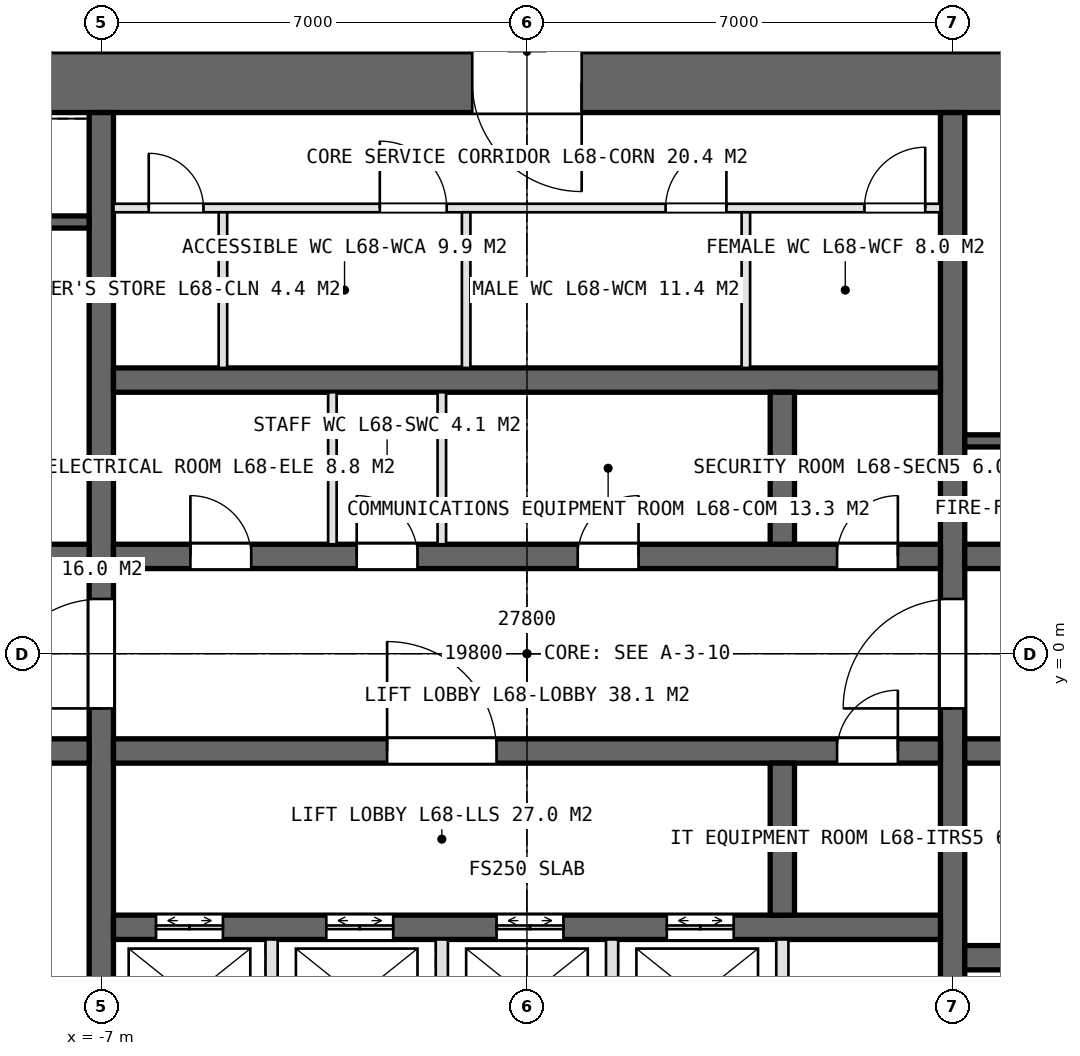
"""IFC4 building model, lengths in metres.
Left out: names, types, materials, properties, quantities, classifications, styles, units other than length and angle.
Written with IfcOpenShell. Run it as: python <this file> out.ifc"""

import sys

from ifc_helpers import new_model, si_unit, direction, frame, frame_2d, origin, place, context, subcontext, project, spatial, rectangle, extrude, element, fill, save


model = new_model("IFC4")
c1 = context("Model", 3, precision=1e-05, world=origin(), true_north=direction((0.0, 1.0)))
c2 = subcontext(c1, "Body", "Model", "MODEL_VIEW")
j1 = project(units=[si_unit("LENGTHUNIT", "METRE"), si_unit("PLANEANGLEUNIT", "RADIAN")], contexts=[c1])
p1 = place(None, origin())
s1 = spatial("IfcSite", under=j1, at=p1, CompositionType="ELEMENT")
p2 = place(p1, origin())
s2 = spatial("IfcBuilding", under=s1, at=p2, CompositionType="ELEMENT")
p3 = place(p2, frame((0.0, 0.0, 304.8)))
s3 = spatial("IfcBuildingStorey", under=s2, at=p3, CompositionType="ELEMENT", Elevation=304.8)
p4 = place(p3, frame((13.9, 9.4, 0.0), z_axis=(0.0, 0.0, 1.0), x_axis=(-1.0, 0.0, 0.0)))
e1 = element("IfcWall", 1, at=p4, inside=s3, PredefinedType="SHEAR", context=c2, shape_type="SweptSolid", body=[
    extrude(rectangle(XDim=27.8, YDim=1.0, at=frame_2d((13.9, 0.0))), origin(), (0.0, 0.0, 1.0), 4.2),
])
p5 = place(p4, frame((23.9, 0.0, 0.0)))
e2 = element("IfcOpeningElement", 2, at=p5, cuts=e1, PredefinedType="OPENING", context=c2, shape_type="SweptSolid", body=[
    extrude(rectangle(XDim=1.0, YDim=2.4, at=frame_2d((0.5, 1.2))), frame((0.0, 0.51, 0.0), z_axis=(0.0, -1.0, 0.0), x_axis=(1.0, 0.0, 0.0)), (0.0, 0.0, 1.0), 1.02),
])
p6 = place(p4, frame((13.0, 0.0, 0.0)))
e3 = element("IfcOpeningElement", 3, at=p6, cuts=e1, PredefinedType="OPENING", context=c2, shape_type="SweptSolid", body=[
    extrude(rectangle(XDim=1.8, YDim=2.4, at=frame_2d((0.9, 1.2))), frame((0.0, 0.51, 0.0), z_axis=(0.0, -1.0, 0.0), x_axis=(1.0, 0.0, 0.0)), (0.0, 0.0, 1.0), 1.02),
])
p7 = place(p3, frame((-7.0, -8.9, 0.0), z_axis=(0.0, 0.0, 1.0), x_axis=(0.0, 1.0, 0.0)))
e4 = element("IfcWall", 4, at=p7, inside=s3, PredefinedType="SHEAR", context=c2, shape_type="SweptSolid", body=[
    extrude(rectangle(XDim=17.8, YDim=0.4, at=frame_2d((8.9, 0.0))), origin(), (0.0, 0.0, 1.0), 4.2),
])
p8 = place(p7, frame((8.0, 0.0, 0.0)))
e5 = element("IfcOpeningElement", 5, at=p8, cuts=e4, PredefinedType="OPENING", context=c2, shape_type="SweptSolid", body=[
    extrude(rectangle(XDim=1.8, YDim=2.4, at=frame_2d((0.9, 1.2))), frame((0.0, 0.21, 0.0), z_axis=(0.0, -1.0, 0.0), x_axis=(1.0, 0.0, 0.0)), (0.0, 0.0, 1.0), 0.42),
])
p9 = place(p3, frame((7.0, -8.9, 0.0), z_axis=(0.0, 0.0, 1.0), x_axis=(0.0, 1.0, 0.0)))
e6 = element("IfcWall", 6, at=p9, inside=s3, PredefinedType="SHEAR", context=c2, shape_type="SweptSolid", body=[
    extrude(rectangle(XDim=17.8, YDim=0.4, at=frame_2d((8.9, 0.0))), origin(), (0.0, 0.0, 1.0), 4.2),
])
p10 = place(p9, frame((8.0, 0.0, 0.0)))
e7 = element("IfcOpeningElement", 7, at=p10, cuts=e6, PredefinedType="OPENING", context=c2, shape_type="SweptSolid", body=[
    extrude(rectangle(XDim=1.8, YDim=2.4, at=frame_2d((0.9, 1.2))), frame((0.0, 0.21, 0.0), z_axis=(0.0, -1.0, 0.0), x_axis=(1.0, 0.0, 0.0)), (0.0, 0.0, 1.0), 0.42),
])
p11 = place(p3, frame((-6.8, 1.6, 0.0), z_axis=(0.0, 0.0, 1.0), x_axis=(1.0, 0.0, 0.0)))
e8 = element("IfcWall", 8, at=p11, inside=s3, PredefinedType="SHEAR", context=c2, shape_type="SweptSolid", body=[
    extrude(rectangle(XDim=13.6, YDim=0.4, at=frame_2d((6.8, 0.0))), origin(), (0.0, 0.0, 1.0), 4.2),
])
p12 = place(p11, frame((1.265, 0.0, 0.0)))
e9 = element("IfcOpeningElement", 9, at=p12, cuts=e8, PredefinedType="OPENING", context=c2, shape_type="SweptSolid", body=[
    extrude(rectangle(XDim=1.0, YDim=2.4, at=frame_2d((0.5, 1.2))), frame((0.0, 0.21, 0.0), z_axis=(0.0, -1.0, 0.0), x_axis=(1.0, 0.0, 0.0)), (0.0, 0.0, 1.0), 0.42),
])
p13 = place(p11, frame((4.0, 0.0, 0.0)))
e10 = element("IfcOpeningElement", 10, at=p13, cuts=e8, PredefinedType="OPENING", context=c2, shape_type="SweptSolid", body=[
    extrude(rectangle(XDim=1.0, YDim=2.4, at=frame_2d((0.5, 1.2))), frame((0.0, 0.21, 0.0), z_axis=(0.0, -1.0, 0.0), x_axis=(1.0, 0.0, 0.0)), (0.0, 0.0, 1.0), 0.42),
])
p14 = place(p11, frame((7.635, 0.0, 0.0)))
e11 = element("IfcOpeningElement", 11, at=p14, cuts=e8, PredefinedType="OPENING", context=c2, shape_type="SweptSolid", body=[
    extrude(rectangle(XDim=1.0, YDim=2.4, at=frame_2d((0.5, 1.2))), frame((0.0, 0.21, 0.0), z_axis=(0.0, -1.0, 0.0), x_axis=(1.0, 0.0, 0.0)), (0.0, 0.0, 1.0), 0.42),
])
p15 = place(p11, frame((11.9, 0.0, 0.0)))
e12 = element("IfcOpeningElement", 12, at=p15, cuts=e8, PredefinedType="OPENING", context=c2, shape_type="SweptSolid", body=[
    extrude(rectangle(XDim=1.0, YDim=2.4, at=frame_2d((0.5, 1.2))), frame((0.0, 0.21, 0.0), z_axis=(0.0, -1.0, 0.0), x_axis=(1.0, 0.0, 0.0)), (0.0, 0.0, 1.0), 0.42),
])
p16 = place(p3, frame((-6.8, -1.6, 0.0), z_axis=(0.0, 0.0, 1.0), x_axis=(1.0, 0.0, 0.0)))
e13 = element("IfcWall", 13, at=p16, inside=s3, PredefinedType="SHEAR", context=c2, shape_type="SweptSolid", body=[
    extrude(rectangle(XDim=13.6, YDim=0.4, at=frame_2d((6.8, 0.0))), origin(), (0.0, 0.0, 1.0), 4.2),
])
p17 = place(p16, frame((11.9, 0.0, 0.0)))
e14 = element("IfcOpeningElement", 14, at=p17, cuts=e13, PredefinedType="OPENING", context=c2, shape_type="SweptSolid", body=[
    extrude(rectangle(XDim=1.0, YDim=2.4, at=frame_2d((0.5, 1.2))), frame((0.0, 0.21, 0.0), z_axis=(0.0, -1.0, 0.0), x_axis=(1.0, 0.0, 0.0)), (0.0, 0.0, 1.0), 0.42),
])
p18 = place(p16, frame((4.5, 0.0, 0.0)))
e15 = element("IfcOpeningElement", 15, at=p18, cuts=e13, PredefinedType="OPENING", context=c2, shape_type="SweptSolid", body=[
    extrude(rectangle(XDim=1.8, YDim=2.4, at=frame_2d((0.9, 1.2))), frame((0.0, 0.21, 0.0), z_axis=(0.0, -1.0, 0.0), x_axis=(1.0, 0.0, 0.0)), (0.0, 0.0, 1.0), 0.42),
])
p19 = place(p3, frame((-6.8, 4.5, 0.0), z_axis=(0.0, 0.0, 1.0), x_axis=(1.0, 0.0, 0.0)))
e16 = element("IfcWall", 16, at=p19, inside=s3, PredefinedType="SHEAR", context=c2, shape_type="SweptSolid", body=[
    extrude(rectangle(XDim=13.6, YDim=0.4, at=frame_2d((6.8, 0.0))), origin(), (0.0, 0.0, 1.0), 4.2),
])
p20 = place(p3, frame((-6.8, -4.5, 0.0), z_axis=(0.0, 0.0, 1.0), x_axis=(1.0, 0.0, 0.0)))
e17 = element("IfcWall", 17, at=p20, inside=s3, PredefinedType="SHEAR", context=c2, shape_type="SweptSolid", body=[
    extrude(rectangle(XDim=13.6, YDim=0.4, at=frame_2d((6.8, 0.0))), origin(), (0.0, 0.0, 1.0), 4.2),
])
p21 = place(p20, frame((0.7, 0.0, 0.0)))
e18 = element("IfcOpeningElement", 18, at=p21, cuts=e17, PredefinedType="OPENING", context=c2, shape_type="SweptSolid", body=[
    extrude(rectangle(XDim=1.1, YDim=2.4, at=frame_2d((0.55, 1.2))), frame((0.0, 0.21, 0.0), z_axis=(0.0, -1.0, 0.0), x_axis=(1.0, 0.0, 0.0)), (0.0, 0.0, 1.0), 0.42),
])
p22 = place(p20, frame((3.5, 0.0, 0.0)))
e19 = element("IfcOpeningElement", 19, at=p22, cuts=e17, PredefinedType="OPENING", context=c2, shape_type="SweptSolid", body=[
    extrude(rectangle(XDim=1.1, YDim=2.4, at=frame_2d((0.55, 1.2))), frame((0.0, 0.21, 0.0), z_axis=(0.0, -1.0, 0.0), x_axis=(1.0, 0.0, 0.0)), (0.0, 0.0, 1.0), 0.42),
])
p23 = place(p20, frame((6.3, 0.0, 0.0)))
e20 = element("IfcOpeningElement", 20, at=p23, cuts=e17, PredefinedType="OPENING", context=c2, shape_type="SweptSolid", body=[
    extrude(rectangle(XDim=1.1, YDim=2.4, at=frame_2d((0.55, 1.2))), frame((0.0, 0.21, 0.0), z_axis=(0.0, -1.0, 0.0), x_axis=(1.0, 0.0, 0.0)), (0.0, 0.0, 1.0), 0.42),
])
p24 = place(p20, frame((9.1, 0.0, 0.0)))
e21 = element("IfcOpeningElement", 21, at=p24, cuts=e17, PredefinedType="OPENING", context=c2, shape_type="SweptSolid", body=[
    extrude(rectangle(XDim=1.1, YDim=2.4, at=frame_2d((0.55, 1.2))), frame((0.0, 0.21, 0.0), z_axis=(0.0, -1.0, 0.0), x_axis=(1.0, 0.0, 0.0)), (0.0, 0.0, 1.0), 0.42),
])
for number, where, z_axis, x_axis in (
    (22, (-12.9, 1.6, 0.0), (0.0, 0.0, 1.0), (1.0, 0.0, 0.0)),
    (23, (-12.9, -1.6, 0.0), (0.0, 0.0, 1.0), (1.0, 0.0, 0.0)),
):
    element("IfcWall", number, at=place(p3, frame(where, z_axis=z_axis, x_axis=x_axis)), inside=s3, PredefinedType="SHEAR", context=c2, shape_type="SweptSolid", body=[
        extrude(rectangle(XDim=5.7, YDim=0.4, at=frame_2d((2.85, 0.0))), origin(), (0.0, 0.0, 1.0), 4.2),
    ])
p25 = place(p3, frame((7.2, 1.6, 0.0), z_axis=(0.0, 0.0, 1.0), x_axis=(1.0, 0.0, 0.0)))
e24 = element("IfcWall", 24, at=p25, inside=s3, PredefinedType="SHEAR", context=c2, shape_type="SweptSolid", body=[
    extrude(rectangle(XDim=5.7, YDim=0.4, at=frame_2d((2.85, 0.0))), origin(), (0.0, 0.0, 1.0), 4.2),
])
p26 = place(p25, frame((0.7, 0.0, 0.0)))
e25 = element("IfcOpeningElement", 25, at=p26, cuts=e24, PredefinedType="OPENING", context=c2, shape_type="SweptSolid", body=[
    extrude(rectangle(XDim=1.0, YDim=2.4, at=frame_2d((0.5, 1.2))), frame((0.0, 0.21, 0.0), z_axis=(0.0, -1.0, 0.0), x_axis=(1.0, 0.0, 0.0)), (0.0, 0.0, 1.0), 0.42),
])
p27 = place(p3, frame((7.2, -1.6, 0.0), z_axis=(0.0, 0.0, 1.0), x_axis=(1.0, 0.0, 0.0)))
e26 = element("IfcWall", 26, at=p27, inside=s3, PredefinedType="SHEAR", context=c2, shape_type="SweptSolid", body=[
    extrude(rectangle(XDim=5.7, YDim=0.4, at=frame_2d((2.85, 0.0))), origin(), (0.0, 0.0, 1.0), 4.2),
])
p28 = place(p27, frame((0.9, 0.0, 0.0)))
e27 = element("IfcOpeningElement", 27, at=p28, cuts=e26, PredefinedType="OPENING", context=c2, shape_type="SweptSolid", body=[
    extrude(rectangle(XDim=1.3, YDim=2.4, at=frame_2d((0.65, 1.2))), frame((0.0, 0.21, 0.0), z_axis=(0.0, -1.0, 0.0), x_axis=(1.0, 0.0, 0.0)), (0.0, 0.0, 1.0), 0.42),
])
p29 = place(p27, frame((3.95, 0.0, 0.0)))
e28 = element("IfcOpeningElement", 28, at=p29, cuts=e26, PredefinedType="OPENING", context=c2, shape_type="SweptSolid", body=[
    extrude(rectangle(XDim=1.3, YDim=2.4, at=frame_2d((0.65, 1.2))), frame((0.0, 0.21, 0.0), z_axis=(0.0, -1.0, 0.0), x_axis=(1.0, 0.0, 0.0)), (0.0, 0.0, 1.0), 0.42),
])
p30 = place(p3, frame((7.2, -5.0, 0.0), z_axis=(0.0, 0.0, 1.0), x_axis=(1.0, 0.0, 0.0)))
e29 = element("IfcWall", 29, at=p30, inside=s3, PredefinedType="SHEAR", context=c2, shape_type="SweptSolid", body=[
    extrude(rectangle(XDim=5.7, YDim=0.4, at=frame_2d((2.85, 0.0))), origin(), (0.0, 0.0, 1.0), 4.2),
])
for number, where, z_axis, x_axis in (
    (30, (4.2, 1.8, 0.0), (0.0, 0.0, 1.0), (0.0, 1.0, 0.0)),
    (31, (4.2, -4.3, 0.0), (0.0, 0.0, 1.0), (0.0, 1.0, 0.0)),
):
    element("IfcWall", number, at=place(p3, frame(where, z_axis=z_axis, x_axis=x_axis)), inside=s3, PredefinedType="SHEAR", context=c2, shape_type="SweptSolid", body=[
        extrude(rectangle(XDim=2.5, YDim=0.4, at=frame_2d((1.25, 0.0))), origin(), (0.0, 0.0, 1.0), 4.2),
    ])
p31 = place(p3, frame((-6.8, 7.33, 0.0), z_axis=(0.0, 0.0, 1.0), x_axis=(1.0, 0.0, 0.0)))
e32 = element("IfcWall", 32, at=p31, inside=s3, PredefinedType="PARTITIONING", context=c2, shape_type="SweptSolid", body=[
    extrude(rectangle(XDim=13.6, YDim=0.14, at=frame_2d((6.8, 0.0))), origin(), (0.0, 0.0, 1.0), 3.95),
])
p32 = place(p31, frame((0.58, 0.0, 0.0)))
e33 = element("IfcOpeningElement", 33, at=p32, cuts=e32, PredefinedType="OPENING", context=c2, shape_type="SweptSolid", body=[
    extrude(rectangle(XDim=0.9, YDim=2.4, at=frame_2d((0.45, 1.2))), frame((0.0, 0.08, 0.0), z_axis=(0.0, -1.0, 0.0), x_axis=(1.0, 0.0, 0.0)), (0.0, 0.0, 1.0), 0.16),
])
p33 = place(p31, frame((4.38, 0.0, 0.0)))
e34 = element("IfcOpeningElement", 34, at=p33, cuts=e32, PredefinedType="OPENING", context=c2, shape_type="SweptSolid", body=[
    extrude(rectangle(XDim=1.1, YDim=2.4, at=frame_2d((0.55, 1.2))), frame((0.0, 0.08, 0.0), z_axis=(0.0, -1.0, 0.0), x_axis=(1.0, 0.0, 0.0)), (0.0, 0.0, 1.0), 0.16),
])
p34 = place(p31, frame((9.08, 0.0, 0.0)))
e35 = element("IfcOpeningElement", 35, at=p34, cuts=e32, PredefinedType="OPENING", context=c2, shape_type="SweptSolid", body=[
    extrude(rectangle(XDim=1.0, YDim=2.4, at=frame_2d((0.5, 1.2))), frame((0.0, 0.08, 0.0), z_axis=(0.0, -1.0, 0.0), x_axis=(1.0, 0.0, 0.0)), (0.0, 0.0, 1.0), 0.16),
])
p35 = place(p31, frame((12.35, 0.0, 0.0)))
e36 = element("IfcOpeningElement", 36, at=p35, cuts=e32, PredefinedType="OPENING", context=c2, shape_type="SweptSolid", body=[
    extrude(rectangle(XDim=1.0, YDim=2.4, at=frame_2d((0.5, 1.2))), frame((0.0, 0.08, 0.0), z_axis=(0.0, -1.0, 0.0), x_axis=(1.0, 0.0, 0.0)), (0.0, 0.0, 1.0), 0.16),
])
for number, where, z_axis, x_axis in (
    (37, (-5.0, 4.7, 0.0), (0.0, 0.0, 1.0), (0.0, 1.0, 0.0)),
    (38, (-1.0, 4.7, 0.0), (0.0, 0.0, 1.0), (0.0, 1.0, 0.0)),
    (39, (3.6, 4.7, 0.0), (0.0, 0.0, 1.0), (0.0, 1.0, 0.0)),
):
    element("IfcWall", number, at=place(p3, frame(where, z_axis=z_axis, x_axis=x_axis)), inside=s3, PredefinedType="PARTITIONING", context=c2, shape_type="SweptSolid", body=[
        extrude(rectangle(XDim=2.56, YDim=0.14, at=frame_2d((1.28, 0.0))), origin(), (0.0, 0.0, 1.0), 3.95),
    ])
for number, where, z_axis, x_axis in (
    (40, (-3.2, 1.8, 0.0), (0.0, 0.0, 1.0), (0.0, 1.0, 0.0)),
    (41, (-1.4, 1.8, 0.0), (0.0, 0.0, 1.0), (0.0, 1.0, 0.0)),
):
    element("IfcWall", number, at=place(p3, frame(where, z_axis=z_axis, x_axis=x_axis)), inside=s3, PredefinedType="PARTITIONING", context=c2, shape_type="SweptSolid", body=[
        extrude(rectangle(XDim=2.5, YDim=0.14, at=frame_2d((1.25, 0.0))), origin(), (0.0, 0.0, 1.0), 3.95),
    ])
for number, where, z_axis, x_axis in (
    (42, (-4.2, -4.7, 0.0), (0.0, 0.0, 1.0), (0.0, -1.0, 0.0)),
    (43, (-1.4, -4.7, 0.0), (0.0, 0.0, 1.0), (0.0, -1.0, 0.0)),
    (44, (1.4, -4.7, 0.0), (0.0, 0.0, 1.0), (0.0, -1.0, 0.0)),
    (45, (4.2, -4.7, 0.0), (0.0, 0.0, 1.0), (0.0, -1.0, 0.0)),
):
    element("IfcWall", number, at=place(p3, frame(where, z_axis=z_axis, x_axis=x_axis)), inside=s3, PredefinedType="PARTITIONING", context=c2, shape_type="SweptSolid", body=[
        extrude(rectangle(XDim=4.2, YDim=0.2, at=frame_2d((2.1, 0.0))), origin(), (0.0, 0.0, 1.0), 4.2),
    ])
for number, where, z_axis, x_axis in (
    (46, (-9.15, 7.1, 0.0), (0.0, 0.0, 1.0), (1.0, 0.0, 0.0)),
    (47, (9.15, 3.5, 0.0), (0.0, 0.0, 1.0), (-1.0, 0.0, 0.0)),
):
    element("IfcWall", number, at=place(p3, frame(where, z_axis=z_axis, x_axis=x_axis)), inside=s3, PredefinedType="SOLIDWALL", context=c2, shape_type="SweptSolid", body=[
        extrude(rectangle(XDim=1.95, YDim=0.2, at=frame_2d((0.975, 0.0))), origin(), (0.0, 0.0, 1.0), 4.2),
    ])
p36 = place(p8, origin())
e48 = element("IfcDoor", 48, at=p36, inside=s3, OperationType="DOUBLE_DOOR_SINGLE_SWING", PredefinedType="DOOR", context=c2, shape_type="SweptSolid", body=[
    extrude(rectangle(XDim=1.8, YDim=2.4, at=frame_2d((0.9, 1.2))), frame((0.0, 0.025, 0.0), z_axis=(0.0, -1.0, 0.0), x_axis=(1.0, 0.0, 0.0)), (0.0, 0.0, 1.0), 0.05),
])
fill(e5, e48)
p37 = place(p10, origin())
e49 = element("IfcDoor", 49, at=p37, inside=s3, OperationType="DOUBLE_DOOR_SINGLE_SWING", PredefinedType="DOOR", context=c2, shape_type="SweptSolid", body=[
    extrude(rectangle(XDim=1.8, YDim=2.4, at=frame_2d((0.9, 1.2))), frame((0.0, 0.025, 0.0), z_axis=(0.0, -1.0, 0.0), x_axis=(1.0, 0.0, 0.0)), (0.0, 0.0, 1.0), 0.05),
])
fill(e7, e49)
p38 = place(p32, origin())
e50 = element("IfcDoor", 50, at=p38, inside=s3, OperationType="SINGLE_SWING_LEFT", PredefinedType="DOOR", context=c2, shape_type="SweptSolid", body=[
    extrude(rectangle(XDim=0.9, YDim=2.4, at=frame_2d((0.45, 1.2))), frame((0.0, 0.025, 0.0), z_axis=(0.0, -1.0, 0.0), x_axis=(1.0, 0.0, 0.0)), (0.0, 0.0, 1.0), 0.05),
])
fill(e33, e50)
p39 = place(p33, origin())
e51 = element("IfcDoor", 51, at=p39, inside=s3, OperationType="SINGLE_SWING_LEFT", PredefinedType="DOOR", context=c2, shape_type="SweptSolid", body=[
    extrude(rectangle(XDim=1.1, YDim=2.4, at=frame_2d((0.55, 1.2))), frame((0.0, 0.025, 0.0), z_axis=(0.0, -1.0, 0.0), x_axis=(1.0, 0.0, 0.0)), (0.0, 0.0, 1.0), 0.05),
])
fill(e34, e51)
p40 = place(p34, origin())
e52 = element("IfcDoor", 52, at=p40, inside=s3, OperationType="SINGLE_SWING_RIGHT", PredefinedType="DOOR", context=c2, shape_type="SweptSolid", body=[
    extrude(rectangle(XDim=1.0, YDim=2.4, at=frame_2d((0.5, 1.2))), frame((0.0, 0.025, 0.0), z_axis=(0.0, -1.0, 0.0), x_axis=(1.0, 0.0, 0.0)), (0.0, 0.0, 1.0), 0.05),
])
fill(e35, e52)
p41 = place(p35, origin())
e53 = element("IfcDoor", 53, at=p41, inside=s3, OperationType="SINGLE_SWING_RIGHT", PredefinedType="DOOR", context=c2, shape_type="SweptSolid", body=[
    extrude(rectangle(XDim=1.0, YDim=2.4, at=frame_2d((0.5, 1.2))), frame((0.0, 0.025, 0.0), z_axis=(0.0, -1.0, 0.0), x_axis=(1.0, 0.0, 0.0)), (0.0, 0.0, 1.0), 0.05),
])
fill(e36, e53)
p42 = place(p12, origin())
e54 = element("IfcDoor", 54, at=p42, inside=s3, OperationType="SINGLE_SWING_LEFT", PredefinedType="DOOR", context=c2, shape_type="SweptSolid", body=[
    extrude(rectangle(XDim=1.0, YDim=2.4, at=frame_2d((0.5, 1.2))), frame((0.0, 0.025, 0.0), z_axis=(0.0, -1.0, 0.0), x_axis=(1.0, 0.0, 0.0)), (0.0, 0.0, 1.0), 0.05),
])
fill(e9, e54)
p43 = place(p13, origin())
e55 = element("IfcDoor", 55, at=p43, inside=s3, OperationType="SINGLE_SWING_LEFT", PredefinedType="DOOR", context=c2, shape_type="SweptSolid", body=[
    extrude(rectangle(XDim=1.0, YDim=2.4, at=frame_2d((0.5, 1.2))), frame((0.0, 0.025, 0.0), z_axis=(0.0, -1.0, 0.0), x_axis=(1.0, 0.0, 0.0)), (0.0, 0.0, 1.0), 0.05),
])
fill(e10, e55)
p44 = place(p14, origin())
e56 = element("IfcDoor", 56, at=p44, inside=s3, OperationType="SINGLE_SWING_RIGHT", PredefinedType="DOOR", context=c2, shape_type="SweptSolid", body=[
    extrude(rectangle(XDim=1.0, YDim=2.4, at=frame_2d((0.5, 1.2))), frame((0.0, 0.025, 0.0), z_axis=(0.0, -1.0, 0.0), x_axis=(1.0, 0.0, 0.0)), (0.0, 0.0, 1.0), 0.05),
])
fill(e11, e56)
p45 = place(p15, origin())
e57 = element("IfcDoor", 57, at=p45, inside=s3, OperationType="SINGLE_SWING_RIGHT", PredefinedType="DOOR", context=c2, shape_type="SweptSolid", body=[
    extrude(rectangle(XDim=1.0, YDim=2.4, at=frame_2d((0.5, 1.2))), frame((0.0, 0.025, 0.0), z_axis=(0.0, -1.0, 0.0), x_axis=(1.0, 0.0, 0.0)), (0.0, 0.0, 1.0), 0.05),
])
fill(e12, e57)
p46 = place(p17, origin())
e58 = element("IfcDoor", 58, at=p46, inside=s3, OperationType="SINGLE_SWING_RIGHT", PredefinedType="DOOR", context=c2, shape_type="SweptSolid", body=[
    extrude(rectangle(XDim=1.0, YDim=2.4, at=frame_2d((0.5, 1.2))), frame((0.0, 0.025, 0.0), z_axis=(0.0, -1.0, 0.0), x_axis=(1.0, 0.0, 0.0)), (0.0, 0.0, 1.0), 0.05),
])
fill(e14, e58)
p47 = place(p18, origin())
e59 = element("IfcDoor", 59, at=p47, inside=s3, OperationType="DOUBLE_DOOR_SINGLE_SWING", PredefinedType="DOOR", context=c2, shape_type="SweptSolid", body=[
    extrude(rectangle(XDim=1.8, YDim=2.4, at=frame_2d((0.9, 1.2))), frame((0.0, 0.025, 0.0), z_axis=(0.0, -1.0, 0.0), x_axis=(1.0, 0.0, 0.0)), (0.0, 0.0, 1.0), 0.05),
])
fill(e15, e59)
p48 = place(p6, origin())
e60 = element("IfcDoor", 60, at=p48, inside=s3, OperationType="DOUBLE_DOOR_SINGLE_SWING", PredefinedType="DOOR", context=c2, shape_type="SweptSolid", body=[
    extrude(rectangle(XDim=1.8, YDim=2.4, at=frame_2d((0.9, 1.2))), frame((0.0, 0.025, 0.0), z_axis=(0.0, -1.0, 0.0), x_axis=(1.0, 0.0, 0.0)), (0.0, 0.0, 1.0), 0.05),
])
fill(e3, e60)
p49 = place(p21, origin())
e61 = element("IfcDoor", 61, at=p49, inside=s3, OperationType="DOUBLE_DOOR_SLIDING", PredefinedType="DOOR", context=c2, shape_type="SweptSolid", body=[
    extrude(rectangle(XDim=1.1, YDim=2.4, at=frame_2d((0.55, 1.2))), frame((0.0, 0.025, 0.0), z_axis=(0.0, -1.0, 0.0), x_axis=(1.0, 0.0, 0.0)), (0.0, 0.0, 1.0), 0.05),
])
fill(e18, e61)
p50 = place(p22, origin())
e62 = element("IfcDoor", 62, at=p50, inside=s3, OperationType="DOUBLE_DOOR_SLIDING", PredefinedType="DOOR", context=c2, shape_type="SweptSolid", body=[
    extrude(rectangle(XDim=1.1, YDim=2.4, at=frame_2d((0.55, 1.2))), frame((0.0, 0.025, 0.0), z_axis=(0.0, -1.0, 0.0), x_axis=(1.0, 0.0, 0.0)), (0.0, 0.0, 1.0), 0.05),
])
fill(e19, e62)
p51 = place(p23, origin())
e63 = element("IfcDoor", 63, at=p51, inside=s3, OperationType="DOUBLE_DOOR_SLIDING", PredefinedType="DOOR", context=c2, shape_type="SweptSolid", body=[
    extrude(rectangle(XDim=1.1, YDim=2.4, at=frame_2d((0.55, 1.2))), frame((0.0, 0.025, 0.0), z_axis=(0.0, -1.0, 0.0), x_axis=(1.0, 0.0, 0.0)), (0.0, 0.0, 1.0), 0.05),
])
fill(e20, e63)
p52 = place(p24, origin())
e64 = element("IfcDoor", 64, at=p52, inside=s3, OperationType="DOUBLE_DOOR_SLIDING", PredefinedType="DOOR", context=c2, shape_type="SweptSolid", body=[
    extrude(rectangle(XDim=1.1, YDim=2.4, at=frame_2d((0.55, 1.2))), frame((0.0, 0.025, 0.0), z_axis=(0.0, -1.0, 0.0), x_axis=(1.0, 0.0, 0.0)), (0.0, 0.0, 1.0), 0.05),
])
fill(e21, e64)
save(model, sys.argv[1])
